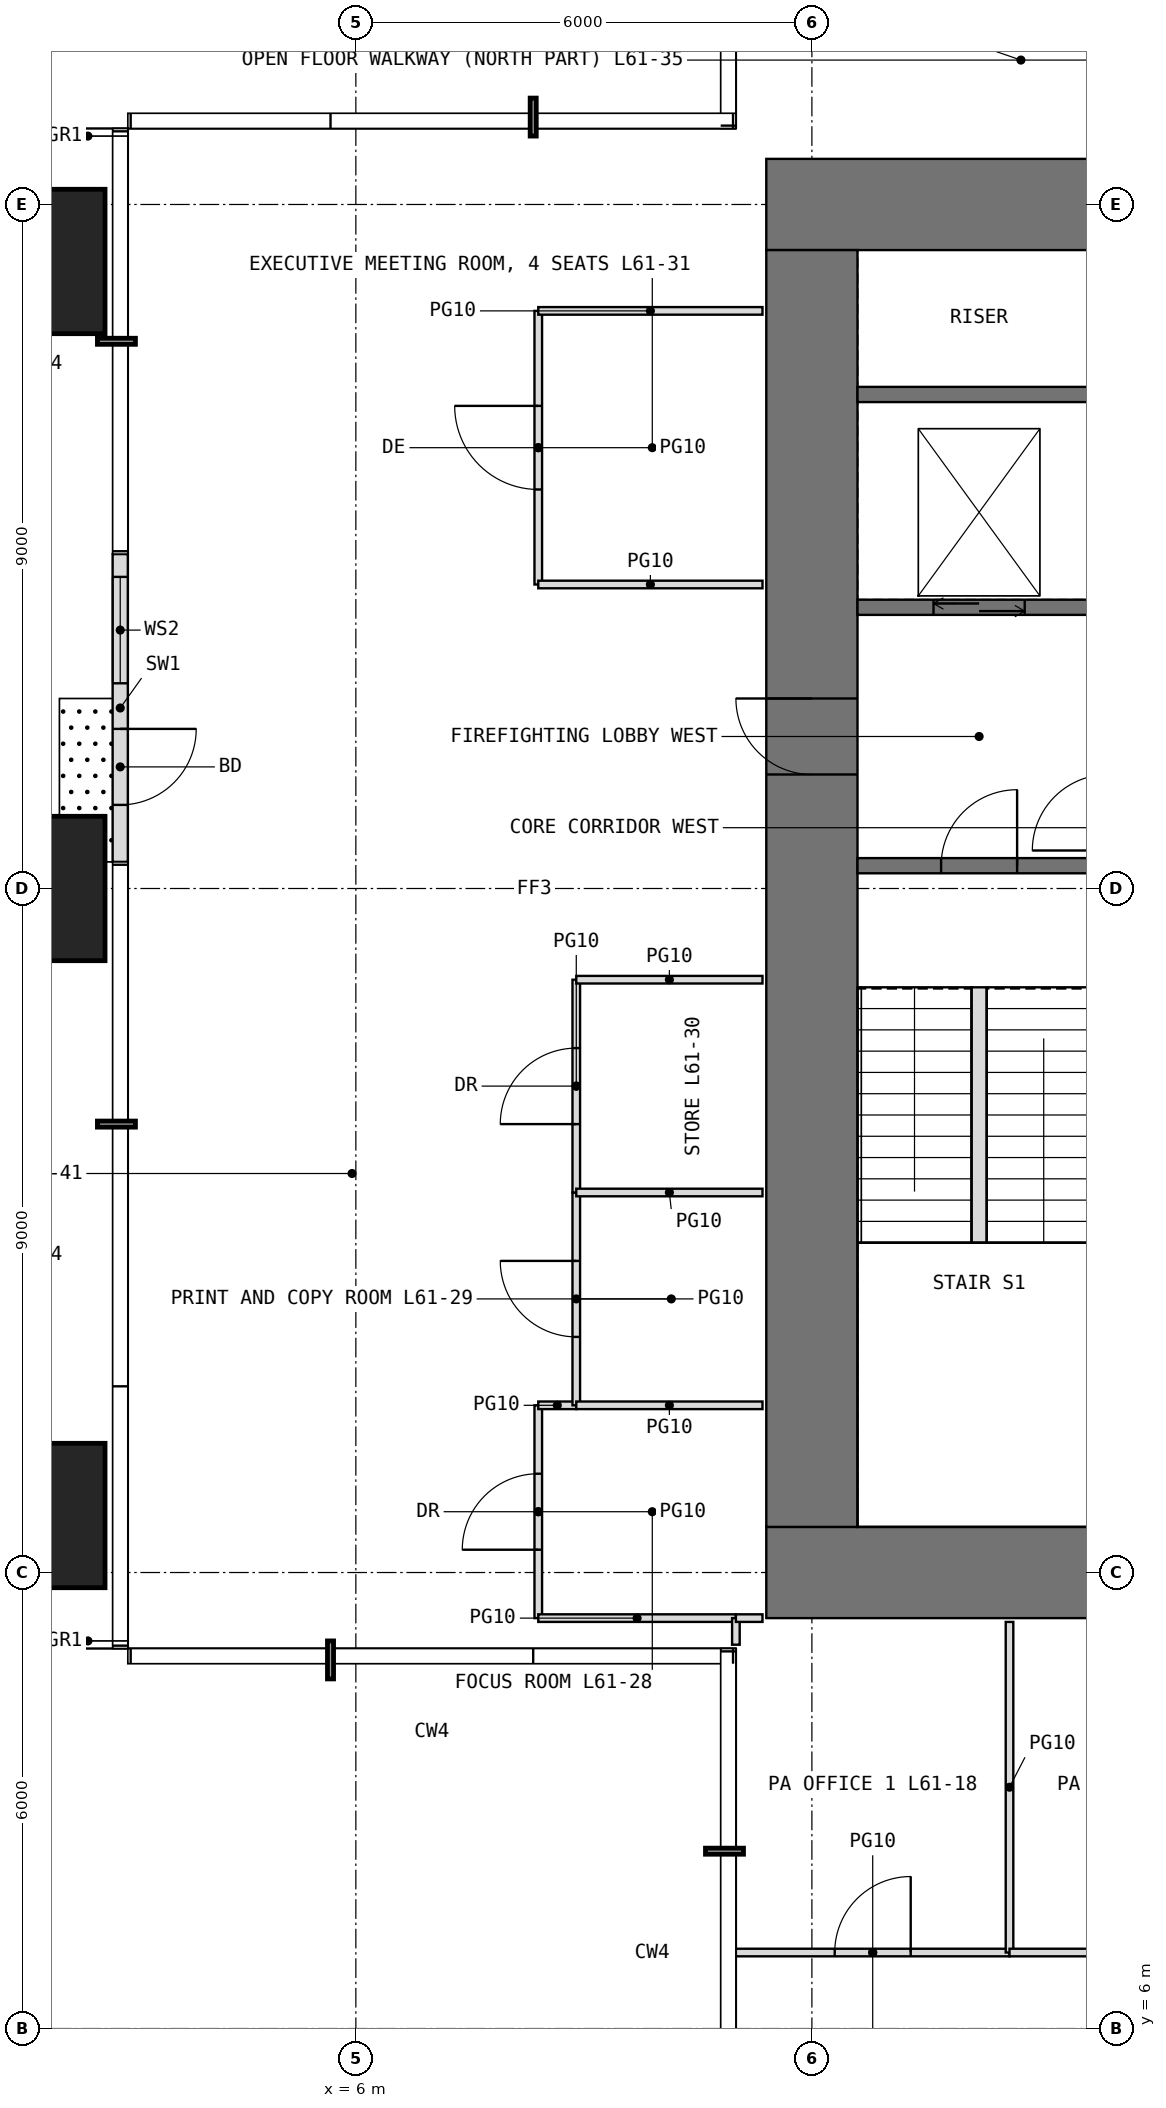
"""IFC4 building model, lengths in metres.
Left out: names, types, materials, properties, quantities, classifications, styles, units other than length and angle.
Written with IfcOpenShell. Run it as: python <this file> out.ifc"""

import sys

from ifc_helpers import new_model, si_unit, direction, frame, frame_2d, origin, origin_2d, place, context, subcontext, project, spatial, rectangle, extrude, element, fill, save


model = new_model("IFC4")
c1 = context("Model", 3, precision=1e-05, world=origin(), true_north=direction((0.0, 1.0)))
c2 = subcontext(c1, "Body", "Model", "MODEL_VIEW")
j1 = project(units=[si_unit("LENGTHUNIT", "METRE"), si_unit("PLANEANGLEUNIT", "RADIAN")], contexts=[c1])
p1 = place(None, origin())
s1 = spatial("IfcSite", under=j1, at=p1, CompositionType="ELEMENT")
p2 = place(p1, origin())
s2 = spatial("IfcBuilding", under=s1, at=p2, CompositionType="ELEMENT")
p3 = place(p2, frame((0.0, 0.0, 256.6)))
s3 = spatial("IfcBuildingStorey", under=s2, at=p3, CompositionType="ELEMENT", Elevation=256.6)
for number, where, z_axis, x_axis in (
    (1, (1.75, 12.75, 0.0), (0.0, 0.0, 1.0), (1.0, 0.0, 0.0)),
    (2, (1.75, 21.0, 0.0), (0.0, 0.0, 1.0), (1.0, 0.0, 0.0)),
    (3, (1.75, 29.25, 0.0), (0.0, 0.0, 1.0), (1.0, 0.0, 0.0)),
):
    element("IfcColumn", number, at=place(p3, frame(where, z_axis=z_axis, x_axis=x_axis)), inside=s3, PredefinedType="COLUMN", context=c2, shape_type="SweptSolid", body=[
        extrude(rectangle(XDim=1.9, YDim=1.9, at=origin_2d()), origin(), (0.0, 0.0, 1.0), 4.2),
    ])
p4 = place(p3, frame((2.9, 25.4, 0.0), z_axis=(0.0, 0.0, 1.0), x_axis=(0.0, -1.0, 0.0)))
e4 = element("IfcWall", 4, at=p4, inside=s3, PredefinedType="USERDEFINED", context=c2, shape_type="SweptSolid", body=[
    extrude(rectangle(XDim=4.05, YDim=0.2, at=frame_2d((2.025, 0.0))), origin(), (0.0, 0.0, 1.0), 3.95),
])
p5 = place(p4, frame((2.3, 0.0, 0.0)))
e5 = element("IfcOpeningElement", 5, at=p5, cuts=e4, PredefinedType="OPENING", context=c2, shape_type="SweptSolid", body=[
    extrude(rectangle(XDim=1.0, YDim=2.4, at=frame_2d((0.5, 1.2))), frame((0.0, 0.11, 0.0), z_axis=(0.0, -1.0, 0.0), x_axis=(1.0, 0.0, 0.0)), (0.0, 0.0, 1.0), 0.22),
])
p6 = place(p4, frame((0.3, 0.0, 0.3)))
e6 = element("IfcOpeningElement", 6, at=p6, cuts=e4, PredefinedType="OPENING", context=c2, shape_type="SweptSolid", body=[
    extrude(rectangle(XDim=1.4, YDim=2.7, at=frame_2d((0.7, 1.35))), frame((0.0, 0.11, 0.0), z_axis=(0.0, -1.0, 0.0), x_axis=(1.0, 0.0, 0.0)), (0.0, 0.0, 1.0), 0.22),
])
p7 = place(p3, frame((11.4, 12.0, -0.05), z_axis=(0.0, 0.0, 1.0), x_axis=(1.0, 0.0, 0.0)))
e7 = element("IfcWall", 7, at=p7, inside=s3, PredefinedType="SHEAR", context=c2, shape_type="SweptSolid", body=[
    extrude(rectangle(XDim=19.2, YDim=1.2, at=frame_2d((9.6, 0.0))), origin(), (0.0, 0.0, 1.0), 4.2),
])
p8 = place(p7, frame((8.6, 0.0, 0.05)))
e8 = element("IfcOpeningElement", 8, at=p8, cuts=e7, PredefinedType="OPENING", context=c2, shape_type="SweptSolid", body=[
    extrude(rectangle(XDim=2.0, YDim=2.2, at=frame_2d((1.0, 1.1))), frame((0.0, 0.61, 0.0), z_axis=(0.0, -1.0, 0.0), x_axis=(1.0, 0.0, 0.0)), (0.0, 0.0, 1.0), 1.22),
])
p9 = place(p3, frame((11.4, 30.0, -0.05), z_axis=(0.0, 0.0, 1.0), x_axis=(1.0, 0.0, 0.0)))
e9 = element("IfcWall", 9, at=p9, inside=s3, PredefinedType="SHEAR", context=c2, shape_type="SweptSolid", body=[
    extrude(rectangle(XDim=19.2, YDim=1.2, at=frame_2d((9.6, 0.0))), origin(), (0.0, 0.0, 1.0), 4.2),
])
p10 = place(p9, frame((8.6, 0.0, 0.05)))
e10 = element("IfcOpeningElement", 10, at=p10, cuts=e9, PredefinedType="OPENING", context=c2, shape_type="SweptSolid", body=[
    extrude(rectangle(XDim=2.0, YDim=2.2, at=frame_2d((1.0, 1.1))), frame((0.0, 0.61, 0.0), z_axis=(0.0, -1.0, 0.0), x_axis=(1.0, 0.0, 0.0)), (0.0, 0.0, 1.0), 1.22),
])
p11 = place(p3, frame((12.0, 12.6, -0.05), z_axis=(0.0, 0.0, 1.0), x_axis=(0.0, 1.0, 0.0)))
e11 = element("IfcWall", 11, at=p11, inside=s3, PredefinedType="SHEAR", context=c2, shape_type="SweptSolid", body=[
    extrude(rectangle(XDim=16.8, YDim=1.2, at=frame_2d((8.4, 0.0))), origin(), (0.0, 0.0, 1.0), 4.2),
])
p12 = place(p11, frame((9.9, 0.0, 0.05)))
e12 = element("IfcOpeningElement", 12, at=p12, cuts=e11, PredefinedType="OPENING", context=c2, shape_type="SweptSolid", body=[
    extrude(rectangle(XDim=1.0, YDim=2.2, at=frame_2d((0.5, 1.1))), frame((0.0, 0.61, 0.0), z_axis=(0.0, -1.0, 0.0), x_axis=(1.0, 0.0, 0.0)), (0.0, 0.0, 1.0), 1.22),
])
p13 = place(p3, frame((12.6, 21.3, -0.05), z_axis=(0.0, 0.0, 1.0), x_axis=(1.0, 0.0, 0.0)))
e13 = element("IfcWall", 13, at=p13, inside=s3, PredefinedType="SHEAR", context=c2, shape_type="SweptSolid", body=[
    extrude(rectangle(XDim=3.2, YDim=0.2, at=frame_2d((1.6, 0.0))), origin(), (0.0, 0.0, 1.0), 4.2),
])
p14 = place(p13, frame((1.1, 0.0, 0.05)))
e14 = element("IfcOpeningElement", 14, at=p14, cuts=e13, PredefinedType="OPENING", context=c2, shape_type="SweptSolid", body=[
    extrude(rectangle(XDim=1.0, YDim=2.2, at=frame_2d((0.5, 1.1))), frame((0.0, 0.11, 0.0), z_axis=(0.0, -1.0, 0.0), x_axis=(1.0, 0.0, 0.0)), (0.0, 0.0, 1.0), 0.22),
])
p15 = place(p3, frame((12.6, 24.7, -0.05), z_axis=(0.0, 0.0, 1.0), x_axis=(1.0, 0.0, 0.0)))
e15 = element("IfcWall", 15, at=p15, inside=s3, PredefinedType="SHEAR", context=c2, shape_type="SweptSolid", body=[
    extrude(rectangle(XDim=3.2, YDim=0.2, at=frame_2d((1.6, 0.0))), origin(), (0.0, 0.0, 1.0), 4.2),
])
p16 = place(p15, frame((1.0, 0.0, 0.05)))
e16 = element("IfcOpeningElement", 16, at=p16, cuts=e15, PredefinedType="OPENING", context=c2, shape_type="SweptSolid", body=[
    extrude(rectangle(XDim=1.2, YDim=2.2, at=frame_2d((0.6, 1.1))), frame((0.0, 0.11, 0.0), z_axis=(0.0, -1.0, 0.0), x_axis=(1.0, 0.0, 0.0)), (0.0, 0.0, 1.0), 0.22),
])
p17 = place(p3, frame((12.6, 27.5, -0.05), z_axis=(0.0, 0.0, 1.0), x_axis=(1.0, 0.0, 0.0)))
e17 = element("IfcWall", 17, at=p17, inside=s3, PredefinedType="SHEAR", context=c2, shape_type="SweptSolid", body=[
    extrude(rectangle(XDim=3.2, YDim=0.2, at=frame_2d((1.6, 0.0))), origin(), (0.0, 0.0, 1.0), 4.2),
])
p18 = place(p3, frame((8.4, 11.4, 0.0), z_axis=(0.0, 0.0, 1.0), x_axis=(0.0, 1.0, 0.0)))
e18 = element("IfcWall", 18, at=p18, inside=s3, PredefinedType="PARTITIONING", context=c2, shape_type="SweptSolid", body=[
    extrude(rectangle(XDim=2.8, YDim=0.1, at=frame_2d((1.4, 0.0))), origin(), (0.0, 0.0, 1.0), 3.95),
])
p19 = place(p18, frame((0.9, 0.0, 0.0)))
e19 = element("IfcOpeningElement", 19, at=p19, cuts=e18, PredefinedType="OPENING", context=c2, shape_type="SweptSolid", body=[
    extrude(rectangle(XDim=1.0, YDim=2.2, at=frame_2d((0.5, 1.1))), frame((0.0, 0.06, 0.0), z_axis=(0.0, -1.0, 0.0), x_axis=(1.0, 0.0, 0.0)), (0.0, 0.0, 1.0), 0.12),
])
p20 = place(p3, frame((8.4, 11.4, 0.0), z_axis=(0.0, 0.0, 1.0), x_axis=(1.0, 0.0, 0.0)))
e20 = element("IfcWall", 20, at=p20, inside=s3, PredefinedType="PARTITIONING", context=c2, shape_type="SweptSolid", body=[
    extrude(rectangle(XDim=2.6, YDim=0.1, at=frame_2d((1.3, 0.0))), origin(), (0.0, 0.0, 1.0), 3.95),
])
p21 = place(p3, frame((8.4, 14.2, 0.0), z_axis=(0.0, 0.0, 1.0), x_axis=(1.0, 0.0, 0.0)))
e21 = element("IfcWall", 21, at=p21, inside=s3, PredefinedType="PARTITIONING", context=c2, shape_type="SweptSolid", body=[
    extrude(rectangle(XDim=0.5, YDim=0.1, at=frame_2d((0.25, 0.0))), origin(), (0.0, 0.0, 1.0), 3.95),
])
p22 = place(p3, frame((8.4, 25.0, 0.0), z_axis=(0.0, 0.0, 1.0), x_axis=(0.0, 1.0, 0.0)))
e22 = element("IfcWall", 22, at=p22, inside=s3, PredefinedType="PARTITIONING", context=c2, shape_type="SweptSolid", body=[
    extrude(rectangle(XDim=3.6, YDim=0.1, at=frame_2d((1.8, 0.0))), origin(), (0.0, 0.0, 1.0), 3.95),
])
p23 = place(p22, frame((1.25, 0.0, 0.0)))
e23 = element("IfcOpeningElement", 23, at=p23, cuts=e22, PredefinedType="OPENING", context=c2, shape_type="SweptSolid", body=[
    extrude(rectangle(XDim=1.1, YDim=2.3, at=frame_2d((0.55, 1.15))), frame((0.0, 0.06, 0.0), z_axis=(0.0, -1.0, 0.0), x_axis=(1.0, 0.0, 0.0)), (0.0, 0.0, 1.0), 0.12),
])
for number, where, z_axis, x_axis in (
    (24, (8.4, 25.0, 0.0), (0.0, 0.0, 1.0), (1.0, 0.0, 0.0)),
    (25, (8.4, 28.6, 0.0), (0.0, 0.0, 1.0), (1.0, 0.0, 0.0)),
):
    element("IfcWall", number, at=place(p3, frame(where, z_axis=z_axis, x_axis=x_axis)), inside=s3, PredefinedType="PARTITIONING", context=c2, shape_type="SweptSolid", body=[
        extrude(rectangle(XDim=2.95, YDim=0.1, at=frame_2d((1.475, 0.0))), origin(), (0.0, 0.0, 1.0), 3.95),
    ])
p24 = place(p3, frame((8.9, 14.2, 0.0), z_axis=(0.0, 0.0, 1.0), x_axis=(0.0, 1.0, 0.0)))
e26 = element("IfcWall", 26, at=p24, inside=s3, PredefinedType="PARTITIONING", context=c2, shape_type="SweptSolid", body=[
    extrude(rectangle(XDim=2.8, YDim=0.1, at=frame_2d((1.4, 0.0))), origin(), (0.0, 0.0, 1.0), 3.95),
])
p25 = place(p24, frame((0.9, 0.0, 0.0)))
e27 = element("IfcOpeningElement", 27, at=p25, cuts=e26, PredefinedType="OPENING", context=c2, shape_type="SweptSolid", body=[
    extrude(rectangle(XDim=1.0, YDim=2.2, at=frame_2d((0.5, 1.1))), frame((0.0, 0.06, 0.0), z_axis=(0.0, -1.0, 0.0), x_axis=(1.0, 0.0, 0.0)), (0.0, 0.0, 1.0), 0.12),
])
p26 = place(p3, frame((8.9, 14.2, 0.0), z_axis=(0.0, 0.0, 1.0), x_axis=(1.0, 0.0, 0.0)))
e28 = element("IfcWall", 28, at=p26, inside=s3, PredefinedType="PARTITIONING", context=c2, shape_type="SweptSolid", body=[
    extrude(rectangle(XDim=2.45, YDim=0.1, at=frame_2d((1.225, 0.0))), origin(), (0.0, 0.0, 1.0), 3.95),
])
p27 = place(p3, frame((8.9, 17.0, 0.0), z_axis=(0.0, 0.0, 1.0), x_axis=(0.0, 1.0, 0.0)))
e29 = element("IfcWall", 29, at=p27, inside=s3, PredefinedType="PARTITIONING", context=c2, shape_type="SweptSolid", body=[
    extrude(rectangle(XDim=2.8, YDim=0.1, at=frame_2d((1.4, 0.0))), origin(), (0.0, 0.0, 1.0), 3.95),
])
p28 = place(p27, frame((0.9, 0.0, 0.0)))
e30 = element("IfcOpeningElement", 30, at=p28, cuts=e29, PredefinedType="OPENING", context=c2, shape_type="SweptSolid", body=[
    extrude(rectangle(XDim=1.0, YDim=2.2, at=frame_2d((0.5, 1.1))), frame((0.0, 0.06, 0.0), z_axis=(0.0, -1.0, 0.0), x_axis=(1.0, 0.0, 0.0)), (0.0, 0.0, 1.0), 0.12),
])
for number, where, z_axis, x_axis in (
    (31, (8.9, 17.0, 0.0), (0.0, 0.0, 1.0), (1.0, 0.0, 0.0)),
    (32, (8.9, 19.8, 0.0), (0.0, 0.0, 1.0), (1.0, 0.0, 0.0)),
):
    element("IfcWall", number, at=place(p3, frame(where, z_axis=z_axis, x_axis=x_axis)), inside=s3, PredefinedType="PARTITIONING", context=c2, shape_type="SweptSolid", body=[
        extrude(rectangle(XDim=2.45, YDim=0.1, at=frame_2d((1.225, 0.0))), origin(), (0.0, 0.0, 1.0), 3.95),
    ])
p29 = place(p3, frame((11.0, 7.0, 0.0), z_axis=(0.0, 0.0, 1.0), x_axis=(1.0, 0.0, 0.0)))
e33 = element("IfcWall", 33, at=p29, inside=s3, PredefinedType="PARTITIONING", context=c2, shape_type="SweptSolid", body=[
    extrude(rectangle(XDim=3.6, YDim=0.1, at=frame_2d((1.8, 0.0))), origin(), (0.0, 0.0, 1.0), 3.95),
])
p30 = place(p29, frame((1.3, 0.0, 0.0)))
e34 = element("IfcOpeningElement", 34, at=p30, cuts=e33, PredefinedType="OPENING", context=c2, shape_type="SweptSolid", body=[
    extrude(rectangle(XDim=1.0, YDim=2.2, at=frame_2d((0.5, 1.1))), frame((0.0, 0.06, 0.0), z_axis=(0.0, -1.0, 0.0), x_axis=(1.0, 0.0, 0.0)), (0.0, 0.0, 1.0), 0.12),
])
p31 = place(p3, frame((11.0, 11.05, 0.0), z_axis=(0.0, 0.0, 1.0), x_axis=(0.0, 1.0, 0.0)))
e35 = element("IfcWall", 35, at=p31, inside=s3, PredefinedType="PARTITIONING", context=c2, shape_type="SweptSolid", body=[
    extrude(rectangle(XDim=0.35, YDim=0.1, at=frame_2d((0.175, 0.0))), origin(), (0.0, 0.0, 1.0), 3.95),
])
p32 = place(p3, frame((11.0, 11.4, 0.0), z_axis=(0.0, 0.0, 1.0), x_axis=(1.0, 0.0, 0.0)))
e36 = element("IfcWall", 36, at=p32, inside=s3, PredefinedType="PARTITIONING", context=c2, shape_type="SweptSolid", body=[
    extrude(rectangle(XDim=0.35, YDim=0.1, at=frame_2d((0.175, 0.0))), origin(), (0.0, 0.0, 1.0), 3.95),
])
p33 = place(p3, frame((14.6, 7.0, 0.0), z_axis=(0.0, 0.0, 1.0), x_axis=(0.0, 1.0, 0.0)))
e37 = element("IfcWall", 37, at=p33, inside=s3, PredefinedType="PARTITIONING", context=c2, shape_type="SweptSolid", body=[
    extrude(rectangle(XDim=4.35, YDim=0.1, at=frame_2d((2.175, 0.0))), origin(), (0.0, 0.0, 1.0), 3.95),
])
p34 = place(p3, frame((14.6, 7.0, 0.0), z_axis=(0.0, 0.0, 1.0), x_axis=(1.0, 0.0, 0.0)))
e38 = element("IfcWall", 38, at=p34, inside=s3, PredefinedType="PARTITIONING", context=c2, shape_type="SweptSolid", body=[
    extrude(rectangle(XDim=4.0, YDim=0.1, at=frame_2d((2.0, 0.0))), origin(), (0.0, 0.0, 1.0), 3.95),
])
p35 = place(p34, frame((1.5, 0.0, 0.0)))
e39 = element("IfcOpeningElement", 39, at=p35, cuts=e38, PredefinedType="OPENING", context=c2, shape_type="SweptSolid", body=[
    extrude(rectangle(XDim=1.0, YDim=2.2, at=frame_2d((0.5, 1.1))), frame((0.0, 0.06, 0.0), z_axis=(0.0, -1.0, 0.0), x_axis=(1.0, 0.0, 0.0)), (0.0, 0.0, 1.0), 0.12),
])
p36 = place(p3, frame((14.2, 16.34, 0.0), z_axis=(0.0, 0.0, 1.0), x_axis=(0.0, 1.0, 0.0)))
e40 = element("IfcWall", 40, at=p36, inside=s3, PredefinedType="PARTITIONING", context=c2, shape_type="SweptSolid", body=[
    extrude(rectangle(XDim=3.36, YDim=0.2, at=frame_2d((1.68, 0.0))), origin(), (0.0, 0.0, 1.0), 4.2),
])
p37 = place(p5, origin())
e41 = element("IfcDoor", 41, at=p37, inside=s3, OperationType="SINGLE_SWING_LEFT", PredefinedType="DOOR", context=c2, shape_type="SweptSolid", body=[
    extrude(rectangle(XDim=1.0, YDim=2.4, at=frame_2d((0.5, 1.2))), frame((0.0, 0.025, 0.0), z_axis=(0.0, -1.0, 0.0), x_axis=(1.0, 0.0, 0.0)), (0.0, 0.0, 1.0), 0.05),
])
fill(e5, e41)
p38 = place(p6, origin())
e42 = element("IfcWindow", 42, at=p38, inside=s3, PartitioningType="SINGLE_PANEL", PredefinedType="WINDOW", context=c2, shape_type="SweptSolid", body=[
    extrude(rectangle(XDim=1.4, YDim=2.7, at=frame_2d((0.7, 1.35))), frame((0.0, 0.03, 0.0), z_axis=(0.0, -1.0, 0.0), x_axis=(1.0, 0.0, 0.0)), (0.0, 0.0, 1.0), 0.06),
])
fill(e6, e42)
p39 = place(p12, origin())
e43 = element("IfcDoor", 43, at=p39, inside=s3, OperationType="SINGLE_SWING_RIGHT", PredefinedType="DOOR", context=c2, shape_type="SweptSolid", body=[
    extrude(rectangle(XDim=1.0, YDim=2.2, at=frame_2d((0.5, 1.1))), frame((0.0, 0.025, 0.0), z_axis=(0.0, -1.0, 0.0), x_axis=(1.0, 0.0, 0.0)), (0.0, 0.0, 1.0), 0.05),
])
fill(e12, e43)
p40 = place(p14, origin())
e44 = element("IfcDoor", 44, at=p40, inside=s3, OperationType="SINGLE_SWING_RIGHT", PredefinedType="DOOR", context=c2, shape_type="SweptSolid", body=[
    extrude(rectangle(XDim=1.0, YDim=2.2, at=frame_2d((0.5, 1.1))), frame((0.0, 0.025, 0.0), z_axis=(0.0, -1.0, 0.0), x_axis=(1.0, 0.0, 0.0)), (0.0, 0.0, 1.0), 0.05),
])
fill(e14, e44)
p41 = place(p30, origin())
e45 = element("IfcDoor", 45, at=p41, inside=s3, OperationType="SINGLE_SWING_RIGHT", PredefinedType="DOOR", context=c2, shape_type="SweptSolid", body=[
    extrude(rectangle(XDim=1.0, YDim=2.2, at=frame_2d((0.5, 1.1))), frame((0.0, 0.025, 0.0), z_axis=(0.0, -1.0, 0.0), x_axis=(1.0, 0.0, 0.0)), (0.0, 0.0, 1.0), 0.05),
])
fill(e34, e45)
p42 = place(p19, origin())
e46 = element("IfcDoor", 46, at=p42, inside=s3, OperationType="SINGLE_SWING_LEFT", PredefinedType="DOOR", context=c2, shape_type="SweptSolid", body=[
    extrude(rectangle(XDim=1.0, YDim=2.2, at=frame_2d((0.5, 1.1))), frame((0.0, 0.025, 0.0), z_axis=(0.0, -1.0, 0.0), x_axis=(1.0, 0.0, 0.0)), (0.0, 0.0, 1.0), 0.05),
])
fill(e19, e46)
p43 = place(p25, origin())
e47 = element("IfcDoor", 47, at=p43, inside=s3, OperationType="SINGLE_SWING_RIGHT", PredefinedType="DOOR", context=c2, shape_type="SweptSolid", body=[
    extrude(rectangle(XDim=1.0, YDim=2.2, at=frame_2d((0.5, 1.1))), frame((0.0, 0.025, 0.0), z_axis=(0.0, -1.0, 0.0), x_axis=(1.0, 0.0, 0.0)), (0.0, 0.0, 1.0), 0.05),
])
fill(e27, e47)
p44 = place(p28, origin())
e48 = element("IfcDoor", 48, at=p44, inside=s3, OperationType="SINGLE_SWING_LEFT", PredefinedType="DOOR", context=c2, shape_type="SweptSolid", body=[
    extrude(rectangle(XDim=1.0, YDim=2.2, at=frame_2d((0.5, 1.1))), frame((0.0, 0.025, 0.0), z_axis=(0.0, -1.0, 0.0), x_axis=(1.0, 0.0, 0.0)), (0.0, 0.0, 1.0), 0.05),
])
fill(e30, e48)
p45 = place(p23, origin())
e49 = element("IfcDoor", 49, at=p45, inside=s3, OperationType="SINGLE_SWING_RIGHT", PredefinedType="DOOR", context=c2, shape_type="SweptSolid", body=[
    extrude(rectangle(XDim=1.1, YDim=2.3, at=frame_2d((0.55, 1.15))), frame((0.0, 0.025, 0.0), z_axis=(0.0, -1.0, 0.0), x_axis=(1.0, 0.0, 0.0)), (0.0, 0.0, 1.0), 0.05),
])
fill(e23, e49)
p46 = place(p16, origin())
e50 = element("IfcDoor", 50, at=p46, inside=s3, OperationType="DOUBLE_DOOR_SLIDING", PredefinedType="DOOR", context=c2, shape_type="SweptSolid", body=[
    extrude(rectangle(XDim=1.2, YDim=2.2, at=frame_2d((0.6, 1.1))), frame((0.0, 0.025, 0.0), z_axis=(0.0, -1.0, 0.0), x_axis=(1.0, 0.0, 0.0)), (0.0, 0.0, 1.0), 0.05),
])
fill(e16, e50)
save(model, sys.argv[1])
